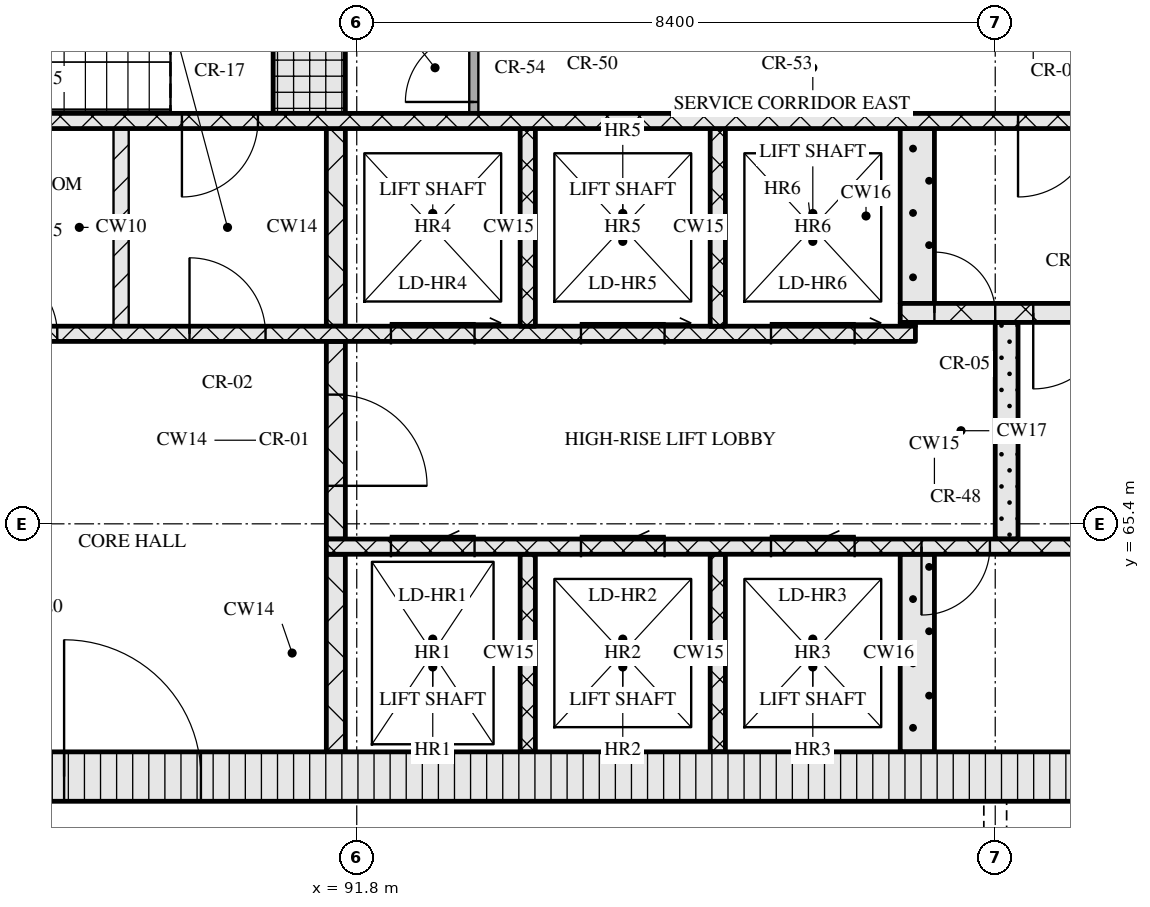
"""IFC4 building model, lengths in metres.
Left out: names, types, materials, properties, quantities, classifications, styles, units other than length and angle.
Written with IfcOpenShell. Run it as: python <this file> out.ifc"""

import sys

from ifc_helpers import new_model, si_unit, direction, frame, frame_2d, origin, place, context, subcontext, project, spatial, rectangle, extrude, element, fill, save


model = new_model("IFC4")
c1 = context("Model", 3, precision=1e-05, world=origin(), true_north=direction((0.0, 1.0)))
c2 = subcontext(c1, "Body", "Model", "MODEL_VIEW")
j1 = project(units=[si_unit("LENGTHUNIT", "METRE"), si_unit("PLANEANGLEUNIT", "RADIAN")], contexts=[c1])
p1 = place(None, origin())
s1 = spatial("IfcSite", under=j1, at=p1, CompositionType="ELEMENT")
p2 = place(p1, origin())
s2 = spatial("IfcBuilding", under=s1, at=p2, CompositionType="ELEMENT")
p3 = place(p2, frame((0.0, 0.0, 205.5)))
s3 = spatial("IfcBuildingStorey", under=s2, at=p3, CompositionType="ELEMENT", Elevation=205.5)
p4 = place(p3, frame((67.15, 62.075, 0.0), z_axis=(0.0, 0.0, 1.0), x_axis=(1.0, 0.0, 0.0)))
e1 = element("IfcWall", 1, at=p4, inside=s3, PredefinedType="SOLIDWALL", context=c2, shape_type="SweptSolid", body=[
    extrude(rectangle(XDim=40.9, YDim=0.65, at=frame_2d((20.45, 0.0))), origin(), (0.0, 0.0, 1.0), 3.32),
])
p5 = place(p4, frame((20.8, 0.0, 0.0)))
e2 = element("IfcOpeningElement", 2, at=p5, cuts=e1, PredefinedType="OPENING", context=c2, shape_type="SweptSolid", body=[
    extrude(rectangle(XDim=1.8, YDim=2.1, at=frame_2d((0.9, 1.05))), frame((0.0, 0.335, 0.0), z_axis=(0.0, -1.0, 0.0), x_axis=(1.0, 0.0, 0.0)), (0.0, 0.0, 1.0), 0.67),
])
p6 = place(p3, frame((91.525, 62.4, 0.0), z_axis=(0.0, 0.0, 1.0), x_axis=(0.0, 1.0, 0.0)))
e3 = element("IfcWall", 3, at=p6, inside=s3, PredefinedType="SOLIDWALL", context=c2, shape_type="SweptSolid", body=[
    extrude(rectangle(XDim=2.6, YDim=0.25, at=frame_2d((1.3, 0.0))), origin(), (0.0, 0.0, 1.0), 3.32),
])
for number, where, z_axis, x_axis in (
    (4, (94.05, 62.4, 0.0), (0.0, 0.0, 1.0), (0.0, 1.0, 0.0)),
    (5, (96.55, 62.4, 0.0), (0.0, 0.0, 1.0), (0.0, 1.0, 0.0)),
):
    element("IfcWall", number, at=place(p3, frame(where, z_axis=z_axis, x_axis=x_axis)), inside=s3, PredefinedType="SOLIDWALL", context=c2, shape_type="SweptSolid", body=[
        extrude(rectangle(XDim=2.6, YDim=0.2, at=frame_2d((1.3, 0.0))), origin(), (0.0, 0.0, 1.0), 3.32),
    ])
p7 = place(p3, frame((99.175, 62.4, 0.0), z_axis=(0.0, 0.0, 1.0), x_axis=(0.0, 1.0, 0.0)))
e6 = element("IfcWall", 6, at=p7, inside=s3, PredefinedType="SOLIDWALL", context=c2, shape_type="SweptSolid", body=[
    extrude(rectangle(XDim=2.6, YDim=0.45, at=frame_2d((1.3, 0.0))), origin(), (0.0, 0.0, 1.0), 3.32),
])
p8 = place(p3, frame((91.4, 65.1, 0.0), z_axis=(0.0, 0.0, 1.0), x_axis=(1.0, 0.0, 0.0)))
e7 = element("IfcWall", 7, at=p8, inside=s3, PredefinedType="SOLIDWALL", context=c2, shape_type="SweptSolid", body=[
    extrude(rectangle(XDim=16.0, YDim=0.2, at=frame_2d((8.0, 0.0))), origin(), (0.0, 0.0, 1.0), 3.32),
])
p9 = place(p8, frame((0.85, 0.0, 0.0)))
e8 = element("IfcOpeningElement", 8, at=p9, cuts=e7, PredefinedType="OPENING", context=c2, shape_type="SweptSolid", body=[
    extrude(rectangle(XDim=1.1, YDim=2.1, at=frame_2d((0.55, 1.05))), frame((0.0, 0.11, 0.0), z_axis=(0.0, -1.0, 0.0), x_axis=(1.0, 0.0, 0.0)), (0.0, 0.0, 1.0), 0.22),
])
p10 = place(p8, frame((3.35, 0.0, 0.0)))
e9 = element("IfcOpeningElement", 9, at=p10, cuts=e7, PredefinedType="OPENING", context=c2, shape_type="SweptSolid", body=[
    extrude(rectangle(XDim=1.1, YDim=2.1, at=frame_2d((0.55, 1.05))), frame((0.0, 0.11, 0.0), z_axis=(0.0, -1.0, 0.0), x_axis=(1.0, 0.0, 0.0)), (0.0, 0.0, 1.0), 0.22),
])
p11 = place(p8, frame((5.85, 0.0, 0.0)))
e10 = element("IfcOpeningElement", 10, at=p11, cuts=e7, PredefinedType="OPENING", context=c2, shape_type="SweptSolid", body=[
    extrude(rectangle(XDim=1.1, YDim=2.1, at=frame_2d((0.55, 1.05))), frame((0.0, 0.11, 0.0), z_axis=(0.0, -1.0, 0.0), x_axis=(1.0, 0.0, 0.0)), (0.0, 0.0, 1.0), 0.22),
])
p12 = place(p8, frame((7.83, 0.0, 0.0)))
e11 = element("IfcOpeningElement", 11, at=p12, cuts=e7, PredefinedType="OPENING", context=c2, shape_type="SweptSolid", body=[
    extrude(rectangle(XDim=0.9, YDim=2.1, at=frame_2d((0.45, 1.05))), frame((0.0, 0.11, 0.0), z_axis=(0.0, -1.0, 0.0), x_axis=(1.0, 0.0, 0.0)), (0.0, 0.0, 1.0), 0.22),
])
p13 = place(p3, frame((91.525, 65.2, 0.0), z_axis=(0.0, 0.0, 1.0), x_axis=(0.0, 1.0, 0.0)))
e12 = element("IfcWall", 12, at=p13, inside=s3, PredefinedType="SOLIDWALL", context=c2, shape_type="SweptSolid", body=[
    extrude(rectangle(XDim=2.6, YDim=0.25, at=frame_2d((1.3, 0.0))), origin(), (0.0, 0.0, 1.0), 3.32),
])
p14 = place(p13, frame((0.7, 0.0, 0.0)))
e13 = element("IfcOpeningElement", 13, at=p14, cuts=e12, PredefinedType="OPENING", context=c2, shape_type="SweptSolid", body=[
    extrude(rectangle(XDim=1.2, YDim=2.1, at=frame_2d((0.6, 1.05))), frame((0.0, 0.135, 0.0), z_axis=(0.0, -1.0, 0.0), x_axis=(1.0, 0.0, 0.0)), (0.0, 0.0, 1.0), 0.27),
])
p15 = place(p3, frame((100.35, 65.2, 0.0), z_axis=(0.0, 0.0, 1.0), x_axis=(0.0, 1.0, 0.0)))
e14 = element("IfcWall", 14, at=p15, inside=s3, PredefinedType="SOLIDWALL", context=c2, shape_type="SweptSolid", body=[
    extrude(rectangle(XDim=2.85, YDim=0.3, at=frame_2d((1.425, 0.0))), origin(), (0.0, 0.0, 1.0), 3.32),
])
p16 = place(p3, frame((76.05, 67.9, 0.0), z_axis=(0.0, 0.0, 1.0), x_axis=(1.0, 0.0, 0.0)))
e15 = element("IfcWall", 15, at=p16, inside=s3, PredefinedType="SOLIDWALL", context=c2, shape_type="SweptSolid", body=[
    extrude(rectangle(XDim=23.1, YDim=0.2, at=frame_2d((11.55, 0.0))), origin(), (0.0, 0.0, 1.0), 3.32),
])
p17 = place(p16, frame((1.4, 0.0, 0.0)))
e16 = element("IfcOpeningElement", 16, at=p17, cuts=e15, PredefinedType="OPENING", context=c2, shape_type="SweptSolid", body=[
    extrude(rectangle(XDim=0.9, YDim=2.1, at=frame_2d((0.45, 1.05))), frame((0.0, 0.11, 0.0), z_axis=(0.0, -1.0, 0.0), x_axis=(1.0, 0.0, 0.0)), (0.0, 0.0, 1.0), 0.22),
])
p18 = place(p16, frame((5.11, 0.0, 0.0)))
e17 = element("IfcOpeningElement", 17, at=p18, cuts=e15, PredefinedType="OPENING", context=c2, shape_type="SweptSolid", body=[
    extrude(rectangle(XDim=0.9, YDim=2.1, at=frame_2d((0.45, 1.05))), frame((0.0, 0.11, 0.0), z_axis=(0.0, -1.0, 0.0), x_axis=(1.0, 0.0, 0.0)), (0.0, 0.0, 1.0), 0.22),
])
p19 = place(p16, frame((8.45, 0.0, 0.0)))
e18 = element("IfcOpeningElement", 18, at=p19, cuts=e15, PredefinedType="OPENING", context=c2, shape_type="SweptSolid", body=[
    extrude(rectangle(XDim=0.9, YDim=2.1, at=frame_2d((0.45, 1.05))), frame((0.0, 0.11, 0.0), z_axis=(0.0, -1.0, 0.0), x_axis=(1.0, 0.0, 0.0)), (0.0, 0.0, 1.0), 0.22),
])
p20 = place(p16, frame((10.91, 0.0, 0.0)))
e19 = element("IfcOpeningElement", 19, at=p20, cuts=e15, PredefinedType="OPENING", context=c2, shape_type="SweptSolid", body=[
    extrude(rectangle(XDim=0.9, YDim=2.1, at=frame_2d((0.45, 1.05))), frame((0.0, 0.11, 0.0), z_axis=(0.0, -1.0, 0.0), x_axis=(1.0, 0.0, 0.0)), (0.0, 0.0, 1.0), 0.22),
])
p21 = place(p16, frame((13.55, 0.0, 0.0)))
e20 = element("IfcOpeningElement", 20, at=p21, cuts=e15, PredefinedType="OPENING", context=c2, shape_type="SweptSolid", body=[
    extrude(rectangle(XDim=1.0, YDim=2.1, at=frame_2d((0.5, 1.05))), frame((0.0, 0.11, 0.0), z_axis=(0.0, -1.0, 0.0), x_axis=(1.0, 0.0, 0.0)), (0.0, 0.0, 1.0), 0.22),
])
p22 = place(p16, frame((16.2, 0.0, 0.0)))
e21 = element("IfcOpeningElement", 21, at=p22, cuts=e15, PredefinedType="OPENING", context=c2, shape_type="SweptSolid", body=[
    extrude(rectangle(XDim=1.1, YDim=2.1, at=frame_2d((0.55, 1.05))), frame((0.0, 0.11, 0.0), z_axis=(0.0, -1.0, 0.0), x_axis=(1.0, 0.0, 0.0)), (0.0, 0.0, 1.0), 0.22),
])
p23 = place(p16, frame((18.7, 0.0, 0.0)))
e22 = element("IfcOpeningElement", 22, at=p23, cuts=e15, PredefinedType="OPENING", context=c2, shape_type="SweptSolid", body=[
    extrude(rectangle(XDim=1.1, YDim=2.1, at=frame_2d((0.55, 1.05))), frame((0.0, 0.11, 0.0), z_axis=(0.0, -1.0, 0.0), x_axis=(1.0, 0.0, 0.0)), (0.0, 0.0, 1.0), 0.22),
])
p24 = place(p16, frame((21.2, 0.0, 0.0)))
e23 = element("IfcOpeningElement", 23, at=p24, cuts=e15, PredefinedType="OPENING", context=c2, shape_type="SweptSolid", body=[
    extrude(rectangle(XDim=1.1, YDim=2.1, at=frame_2d((0.55, 1.05))), frame((0.0, 0.11, 0.0), z_axis=(0.0, -1.0, 0.0), x_axis=(1.0, 0.0, 0.0)), (0.0, 0.0, 1.0), 0.22),
])
p25 = place(p3, frame((88.7, 68.0, 0.0), z_axis=(0.0, 0.0, 1.0), x_axis=(0.0, 1.0, 0.0)))
e24 = element("IfcWall", 24, at=p25, inside=s3, PredefinedType="PARTITIONING", context=c2, shape_type="SweptSolid", body=[
    extrude(rectangle(XDim=2.6, YDim=0.2, at=frame_2d((1.3, 0.0))), origin(), (0.0, 0.0, 1.0), 3.32),
])
p26 = place(p3, frame((91.525, 68.0, 0.0), z_axis=(0.0, 0.0, 1.0), x_axis=(0.0, 1.0, 0.0)))
e25 = element("IfcWall", 25, at=p26, inside=s3, PredefinedType="SOLIDWALL", context=c2, shape_type="SweptSolid", body=[
    extrude(rectangle(XDim=2.6, YDim=0.25, at=frame_2d((1.3, 0.0))), origin(), (0.0, 0.0, 1.0), 3.32),
])
for number, where, z_axis, x_axis in (
    (26, (94.05, 68.0, 0.0), (0.0, 0.0, 1.0), (0.0, 1.0, 0.0)),
    (27, (96.55, 68.0, 0.0), (0.0, 0.0, 1.0), (0.0, 1.0, 0.0)),
):
    element("IfcWall", number, at=place(p3, frame(where, z_axis=z_axis, x_axis=x_axis)), inside=s3, PredefinedType="SOLIDWALL", context=c2, shape_type="SweptSolid", body=[
        extrude(rectangle(XDim=2.6, YDim=0.2, at=frame_2d((1.3, 0.0))), origin(), (0.0, 0.0, 1.0), 3.32),
    ])
p27 = place(p3, frame((98.95, 68.025, 0.0), z_axis=(0.0, 0.0, 1.0), x_axis=(1.0, 0.0, 0.0)))
e28 = element("IfcWall", 28, at=p27, inside=s3, PredefinedType="SOLIDWALL", context=c2, shape_type="SweptSolid", body=[
    extrude(rectangle(XDim=0.2, YDim=0.05, at=frame_2d((0.1, 0.0))), origin(), (0.0, 0.0, 1.0), 3.32),
])
p28 = place(p3, frame((98.95, 68.175, 0.0), z_axis=(0.0, 0.0, 1.0), x_axis=(1.0, 0.0, 0.0)))
e29 = element("IfcWall", 29, at=p28, inside=s3, PredefinedType="SOLIDWALL", context=c2, shape_type="SweptSolid", body=[
    extrude(rectangle(XDim=8.45, YDim=0.25, at=frame_2d((4.225, 0.0))), origin(), (0.0, 0.0, 1.0), 3.32),
])
p29 = place(p28, frame((0.45, 0.0, 0.0)))
e30 = element("IfcOpeningElement", 30, at=p29, cuts=e29, PredefinedType="OPENING", context=c2, shape_type="SweptSolid", body=[
    extrude(rectangle(XDim=0.8, YDim=2.1, at=frame_2d((0.4, 1.05))), frame((0.0, 0.135, 0.0), z_axis=(0.0, -1.0, 0.0), x_axis=(1.0, 0.0, 0.0)), (0.0, 0.0, 1.0), 0.27),
])
p30 = place(p28, frame((1.75, 0.0, 0.0)))
e31 = element("IfcOpeningElement", 31, at=p30, cuts=e29, PredefinedType="OPENING", context=c2, shape_type="SweptSolid", body=[
    extrude(rectangle(XDim=1.0, YDim=2.1, at=frame_2d((0.5, 1.05))), frame((0.0, 0.135, 0.0), z_axis=(0.0, -1.0, 0.0), x_axis=(1.0, 0.0, 0.0)), (0.0, 0.0, 1.0), 0.27),
])
p31 = place(p3, frame((99.175, 68.3, 0.0), z_axis=(0.0, 0.0, 1.0), x_axis=(0.0, 1.0, 0.0)))
e32 = element("IfcWall", 32, at=p31, inside=s3, PredefinedType="SOLIDWALL", context=c2, shape_type="SweptSolid", body=[
    extrude(rectangle(XDim=2.3, YDim=0.45, at=frame_2d((1.15, 0.0))), origin(), (0.0, 0.0, 1.0), 3.32),
])
p32 = place(p3, frame((67.8, 70.7, 0.0), z_axis=(0.0, 0.0, 1.0), x_axis=(1.0, 0.0, 0.0)))
e33 = element("IfcWall", 33, at=p32, inside=s3, PredefinedType="SOLIDWALL", context=c2, shape_type="SweptSolid", body=[
    extrude(rectangle(XDim=39.6, YDim=0.2, at=frame_2d((19.8, 0.0))), origin(), (0.0, 0.0, 1.0), 3.32),
])
p33 = place(p32, frame((0.65, 0.0, 0.0)))
e34 = element("IfcOpeningElement", 34, at=p33, cuts=e33, PredefinedType="OPENING", context=c2, shape_type="SweptSolid", body=[
    extrude(rectangle(XDim=1.1, YDim=2.1, at=frame_2d((0.55, 1.05))), frame((0.0, 0.11, 0.0), z_axis=(0.0, -1.0, 0.0), x_axis=(1.0, 0.0, 0.0)), (0.0, 0.0, 1.0), 0.22),
])
p34 = place(p32, frame((3.25, 0.0, 0.0)))
e35 = element("IfcOpeningElement", 35, at=p34, cuts=e33, PredefinedType="OPENING", context=c2, shape_type="SweptSolid", body=[
    extrude(rectangle(XDim=1.1, YDim=2.1, at=frame_2d((0.55, 1.05))), frame((0.0, 0.11, 0.0), z_axis=(0.0, -1.0, 0.0), x_axis=(1.0, 0.0, 0.0)), (0.0, 0.0, 1.0), 0.22),
])
p35 = place(p32, frame((5.9, 0.0, 0.0)))
e36 = element("IfcOpeningElement", 36, at=p35, cuts=e33, PredefinedType="OPENING", context=c2, shape_type="SweptSolid", body=[
    extrude(rectangle(XDim=1.0, YDim=2.1, at=frame_2d((0.5, 1.05))), frame((0.0, 0.11, 0.0), z_axis=(0.0, -1.0, 0.0), x_axis=(1.0, 0.0, 0.0)), (0.0, 0.0, 1.0), 0.22),
])
p36 = place(p32, frame((21.7, 0.0, 0.0)))
e37 = element("IfcOpeningElement", 37, at=p36, cuts=e33, PredefinedType="OPENING", context=c2, shape_type="SweptSolid", body=[
    extrude(rectangle(XDim=1.0, YDim=2.1, at=frame_2d((0.5, 1.05))), frame((0.0, 0.11, 0.0), z_axis=(0.0, -1.0, 0.0), x_axis=(1.0, 0.0, 0.0)), (0.0, 0.0, 1.0), 0.22),
])
p37 = place(p32, frame((32.7, 0.0, 0.0)))
e38 = element("IfcOpeningElement", 38, at=p37, cuts=e33, PredefinedType="OPENING", context=c2, shape_type="SweptSolid", body=[
    extrude(rectangle(XDim=1.0, YDim=2.1, at=frame_2d((0.5, 1.05))), frame((0.0, 0.11, 0.0), z_axis=(0.0, -1.0, 0.0), x_axis=(1.0, 0.0, 0.0)), (0.0, 0.0, 1.0), 0.22),
])
p38 = place(p32, frame((35.25, 0.0, 0.0)))
e39 = element("IfcOpeningElement", 39, at=p38, cuts=e33, PredefinedType="OPENING", context=c2, shape_type="SweptSolid", body=[
    extrude(rectangle(XDim=1.1, YDim=2.1, at=frame_2d((0.55, 1.05))), frame((0.0, 0.11, 0.0), z_axis=(0.0, -1.0, 0.0), x_axis=(1.0, 0.0, 0.0)), (0.0, 0.0, 1.0), 0.22),
])
p39 = place(p32, frame((37.85, 0.0, 0.0)))
e40 = element("IfcOpeningElement", 40, at=p39, cuts=e33, PredefinedType="OPENING", context=c2, shape_type="SweptSolid", body=[
    extrude(rectangle(XDim=1.1, YDim=2.1, at=frame_2d((0.55, 1.05))), frame((0.0, 0.11, 0.0), z_axis=(0.0, -1.0, 0.0), x_axis=(1.0, 0.0, 0.0)), (0.0, 0.0, 1.0), 0.22),
])
p40 = place(p3, frame((91.175, 70.8, 0.0), z_axis=(0.0, 0.0, 1.0), x_axis=(0.0, 1.0, 0.0)))
e41 = element("IfcWall", 41, at=p40, inside=s3, PredefinedType="SOLIDWALL", context=c2, shape_type="SweptSolid", body=[
    extrude(rectangle(XDim=2.95, YDim=0.95, at=frame_2d((1.475, 0.0))), origin(), (0.0, 0.0, 1.0), 3.32),
])
p41 = place(p3, frame((93.34, 70.8, 0.0), z_axis=(0.0, 0.0, 1.0), x_axis=(0.0, 1.0, 0.0)))
e42 = element("IfcWall", 42, at=p41, inside=s3, PredefinedType="PARTITIONING", context=c2, shape_type="SweptSolid", body=[
    extrude(rectangle(XDim=1.2, YDim=0.12, at=frame_2d((0.6, 0.0))), origin(), (0.0, 0.0, 1.0), 3.32),
])
p42 = place(p41, frame((0.15, 0.0, 0.0)))
e43 = element("IfcOpeningElement", 43, at=p42, cuts=e42, PredefinedType="OPENING", context=c2, shape_type="SweptSolid", body=[
    extrude(rectangle(XDim=0.9, YDim=2.1, at=frame_2d((0.45, 1.05))), frame((0.0, 0.07, 0.0), z_axis=(0.0, -1.0, 0.0), x_axis=(1.0, 0.0, 0.0)), (0.0, 0.0, 1.0), 0.14),
])
p43 = place(p5, origin())
e44 = element("IfcDoor", 44, at=p43, inside=s3, OperationType="DOUBLE_DOOR_SINGLE_SWING", PredefinedType="DOOR", context=c2, shape_type="SweptSolid", body=[
    extrude(rectangle(XDim=1.8, YDim=2.1, at=frame_2d((0.9, 1.05))), frame((0.0, 0.025, 0.0), z_axis=(0.0, -1.0, 0.0), x_axis=(1.0, 0.0, 0.0)), (0.0, 0.0, 1.0), 0.05),
])
fill(e2, e44)
p44 = place(p9, origin())
e45 = element("IfcDoor", 45, at=p44, inside=s3, OperationType="SLIDING_TO_LEFT", PredefinedType="DOOR", context=c2, shape_type="SweptSolid", body=[
    extrude(rectangle(XDim=1.1, YDim=2.1, at=frame_2d((0.55, 1.05))), frame((0.0, 0.025, 0.0), z_axis=(0.0, -1.0, 0.0), x_axis=(1.0, 0.0, 0.0)), (0.0, 0.0, 1.0), 0.05),
])
fill(e8, e45)
p45 = place(p10, origin())
e46 = element("IfcDoor", 46, at=p45, inside=s3, OperationType="SLIDING_TO_LEFT", PredefinedType="DOOR", context=c2, shape_type="SweptSolid", body=[
    extrude(rectangle(XDim=1.1, YDim=2.1, at=frame_2d((0.55, 1.05))), frame((0.0, 0.025, 0.0), z_axis=(0.0, -1.0, 0.0), x_axis=(1.0, 0.0, 0.0)), (0.0, 0.0, 1.0), 0.05),
])
fill(e9, e46)
p46 = place(p11, origin())
e47 = element("IfcDoor", 47, at=p46, inside=s3, OperationType="SLIDING_TO_LEFT", PredefinedType="DOOR", context=c2, shape_type="SweptSolid", body=[
    extrude(rectangle(XDim=1.1, YDim=2.1, at=frame_2d((0.55, 1.05))), frame((0.0, 0.025, 0.0), z_axis=(0.0, -1.0, 0.0), x_axis=(1.0, 0.0, 0.0)), (0.0, 0.0, 1.0), 0.05),
])
fill(e10, e47)
p47 = place(p12, origin())
e48 = element("IfcDoor", 48, at=p47, inside=s3, OperationType="SINGLE_SWING_RIGHT", PredefinedType="DOOR", context=c2, shape_type="SweptSolid", body=[
    extrude(rectangle(XDim=0.9, YDim=2.1, at=frame_2d((0.45, 1.05))), frame((0.0, 0.025, 0.0), z_axis=(0.0, -1.0, 0.0), x_axis=(1.0, 0.0, 0.0)), (0.0, 0.0, 1.0), 0.05),
])
fill(e11, e48)
p48 = place(p14, origin())
e49 = element("IfcDoor", 49, at=p48, inside=s3, OperationType="SINGLE_SWING_RIGHT", PredefinedType="DOOR", context=c2, shape_type="SweptSolid", body=[
    extrude(rectangle(XDim=1.2, YDim=2.1, at=frame_2d((0.6, 1.05))), frame((0.0, 0.025, 0.0), z_axis=(0.0, -1.0, 0.0), x_axis=(1.0, 0.0, 0.0)), (0.0, 0.0, 1.0), 0.05),
])
fill(e13, e49)
p49 = place(p20, origin())
e50 = element("IfcDoor", 50, at=p49, inside=s3, OperationType="SINGLE_SWING_LEFT", PredefinedType="DOOR", context=c2, shape_type="SweptSolid", body=[
    extrude(rectangle(XDim=0.9, YDim=2.1, at=frame_2d((0.45, 1.05))), frame((0.0, 0.025, 0.0), z_axis=(0.0, -1.0, 0.0), x_axis=(1.0, 0.0, 0.0)), (0.0, 0.0, 1.0), 0.05),
])
fill(e19, e50)
p50 = place(p21, origin())
e51 = element("IfcDoor", 51, at=p50, inside=s3, OperationType="SINGLE_SWING_LEFT", PredefinedType="DOOR", context=c2, shape_type="SweptSolid", body=[
    extrude(rectangle(XDim=1.0, YDim=2.1, at=frame_2d((0.5, 1.05))), frame((0.0, 0.025, 0.0), z_axis=(0.0, -1.0, 0.0), x_axis=(1.0, 0.0, 0.0)), (0.0, 0.0, 1.0), 0.05),
])
fill(e20, e51)
p51 = place(p22, origin())
e52 = element("IfcDoor", 52, at=p51, inside=s3, OperationType="SLIDING_TO_RIGHT", PredefinedType="DOOR", context=c2, shape_type="SweptSolid", body=[
    extrude(rectangle(XDim=1.1, YDim=2.1, at=frame_2d((0.55, 1.05))), frame((0.0, 0.025, 0.0), z_axis=(0.0, -1.0, 0.0), x_axis=(1.0, 0.0, 0.0)), (0.0, 0.0, 1.0), 0.05),
])
fill(e21, e52)
p52 = place(p23, origin())
e53 = element("IfcDoor", 53, at=p52, inside=s3, OperationType="SLIDING_TO_RIGHT", PredefinedType="DOOR", context=c2, shape_type="SweptSolid", body=[
    extrude(rectangle(XDim=1.1, YDim=2.1, at=frame_2d((0.55, 1.05))), frame((0.0, 0.025, 0.0), z_axis=(0.0, -1.0, 0.0), x_axis=(1.0, 0.0, 0.0)), (0.0, 0.0, 1.0), 0.05),
])
fill(e22, e53)
p53 = place(p24, origin())
e54 = element("IfcDoor", 54, at=p53, inside=s3, OperationType="SLIDING_TO_RIGHT", PredefinedType="DOOR", context=c2, shape_type="SweptSolid", body=[
    extrude(rectangle(XDim=1.1, YDim=2.1, at=frame_2d((0.55, 1.05))), frame((0.0, 0.025, 0.0), z_axis=(0.0, -1.0, 0.0), x_axis=(1.0, 0.0, 0.0)), (0.0, 0.0, 1.0), 0.05),
])
fill(e23, e54)
p54 = place(p29, origin())
e55 = element("IfcDoor", 55, at=p54, inside=s3, OperationType="SINGLE_SWING_LEFT", PredefinedType="DOOR", context=c2, shape_type="SweptSolid", body=[
    extrude(rectangle(XDim=0.8, YDim=2.1, at=frame_2d((0.4, 1.05))), frame((0.0, 0.025, 0.0), z_axis=(0.0, -1.0, 0.0), x_axis=(1.0, 0.0, 0.0)), (0.0, 0.0, 1.0), 0.05),
])
fill(e30, e55)
p55 = place(p30, origin())
e56 = element("IfcDoor", 56, at=p55, inside=s3, OperationType="SINGLE_SWING_RIGHT", PredefinedType="DOOR", context=c2, shape_type="SweptSolid", body=[
    extrude(rectangle(XDim=1.0, YDim=2.1, at=frame_2d((0.5, 1.05))), frame((0.0, 0.025, 0.0), z_axis=(0.0, -1.0, 0.0), x_axis=(1.0, 0.0, 0.0)), (0.0, 0.0, 1.0), 0.05),
])
fill(e31, e56)
p56 = place(p36, origin())
e57 = element("IfcDoor", 57, at=p56, inside=s3, OperationType="SINGLE_SWING_RIGHT", PredefinedType="DOOR", context=c2, shape_type="SweptSolid", body=[
    extrude(rectangle(XDim=1.0, YDim=2.1, at=frame_2d((0.5, 1.05))), frame((0.0, 0.025, 0.0), z_axis=(0.0, -1.0, 0.0), x_axis=(1.0, 0.0, 0.0)), (0.0, 0.0, 1.0), 0.05),
])
fill(e37, e57)
p57 = place(p37, origin())
e58 = element("IfcDoor", 58, at=p57, inside=s3, OperationType="SINGLE_SWING_RIGHT", PredefinedType="DOOR", context=c2, shape_type="SweptSolid", body=[
    extrude(rectangle(XDim=1.0, YDim=2.1, at=frame_2d((0.5, 1.05))), frame((0.0, 0.025, 0.0), z_axis=(0.0, -1.0, 0.0), x_axis=(1.0, 0.0, 0.0)), (0.0, 0.0, 1.0), 0.05),
])
fill(e38, e58)
p58 = place(p42, origin())
e59 = element("IfcDoor", 59, at=p58, inside=s3, OperationType="SINGLE_SWING_LEFT", PredefinedType="DOOR", context=c2, shape_type="SweptSolid", body=[
    extrude(rectangle(XDim=0.9, YDim=2.1, at=frame_2d((0.45, 1.05))), frame((0.0, 0.025, 0.0), z_axis=(0.0, -1.0, 0.0), x_axis=(1.0, 0.0, 0.0)), (0.0, 0.0, 1.0), 0.05),
])
fill(e43, e59)
save(model, sys.argv[1])
